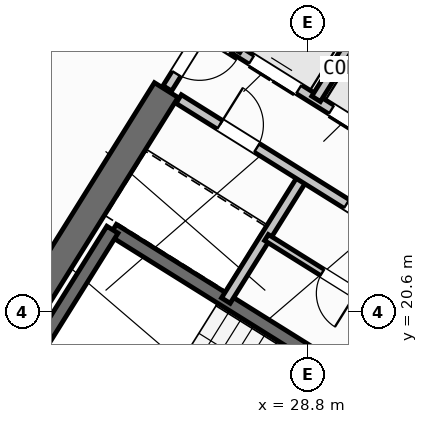
"""IFC4 building model, lengths in metres.
Left out: names, types, materials, properties, quantities, classifications, styles, units other than length and angle.
Written with IfcOpenShell. Run it as: python <this file> out.ifc"""

import sys

from ifc_helpers import new_model, si_unit, direction, frame, frame_2d, origin, place, context, subcontext, project, spatial, rectangle, extrude, source, transform, mapped, element, fill, save


model = new_model("IFC4")
c1 = context("Model", 3, precision=1e-05, world=origin(), true_north=direction((0.0, 1.0)))
c2 = subcontext(c1, "Body", "Model", "MODEL_VIEW")
j1 = project(units=[si_unit("LENGTHUNIT", "METRE"), si_unit("PLANEANGLEUNIT", "RADIAN")], contexts=[c1])
p1 = place(None, origin())
s1 = spatial("IfcSite", under=j1, at=p1, CompositionType="ELEMENT")
p2 = place(p1, origin())
s2 = spatial("IfcBuilding", under=s1, at=p2, CompositionType="ELEMENT")
p3 = place(p2, frame((0.0, 0.0, 174.9)))
s3 = spatial("IfcBuildingStorey", under=s2, at=p3, CompositionType="ELEMENT", Elevation=174.9)
p4 = place(p3, frame((40.573, 24.01, 0.0), z_axis=(0.0, 0.0, 1.0), x_axis=(-0.848047359947, 0.529920442413, 0.0)))
e1 = element("IfcWall", 1, at=p4, inside=s3, PredefinedType="SHEAR", context=c2, shape_type="SweptSolid", body=[
    extrude(rectangle(XDim=13.14, YDim=0.55, at=frame_2d((6.57, 0.0))), origin(), (0.0, 0.0, 1.0), 4.22),
])
p5 = place(p3, frame((26.007, 24.976, 0.0), z_axis=(0.0, 0.0, 1.0), x_axis=(-0.529923795287, -0.848045264823, 0.0)))
e2 = element("IfcWall", 2, at=p5, inside=s3, PredefinedType="SHEAR", context=c2, shape_type="SweptSolid", body=[
    extrude(rectangle(XDim=6.425, YDim=0.55, at=frame_2d((3.212, 0.0))), origin(), (0.0, 0.0, 1.0), 4.22),
])
p6 = place(p3, frame((29.268, 6.429, 0.0), z_axis=(0.0, 0.0, 1.0), x_axis=(-0.848049971435, 0.529916263149, 0.0)))
e3 = element("IfcWall", 3, at=p6, inside=s3, PredefinedType="STANDARD", context=c2, shape_type="SweptSolid", body=[
    extrude(rectangle(XDim=31.588, YDim=0.32, at=frame_2d((15.794, 0.0))), origin(), (0.0, 0.0, 1.0), 4.22),
])
p7 = place(p6, frame((27.641, 0.0, 0.0)))
e4 = element("IfcOpeningElement", 4, at=p7, cuts=e3, PredefinedType="OPENING", context=c2, shape_type="SweptSolid", body=[
    extrude(rectangle(XDim=1.2, YDim=2.15, at=frame_2d((0.6, 1.075))), frame((0.0, 0.17, 0.0), z_axis=(0.0, -1.0, 0.0), x_axis=(1.0, 0.0, 0.0)), (0.0, 0.0, 1.0), 0.34),
])
p8 = place(p6, frame((2.954, 0.0, 0.8)))
e5 = element("IfcOpeningElement", 5, at=p8, cuts=e3, PredefinedType="OPENING", context=c2, shape_type="SweptSolid", body=[
    extrude(rectangle(XDim=2.1, YDim=1.55, at=frame_2d((1.05, 0.775))), frame((0.0, 0.17, 0.0), z_axis=(0.0, -1.0, 0.0), x_axis=(1.0, 0.0, 0.0)), (0.0, 0.0, 1.0), 0.34),
])
p9 = place(p6, frame((8.253, 0.0, 0.8)))
e6 = element("IfcOpeningElement", 6, at=p9, cuts=e3, PredefinedType="OPENING", context=c2, shape_type="SweptSolid", body=[
    extrude(rectangle(XDim=2.1, YDim=1.55, at=frame_2d((1.05, 0.775))), frame((0.0, 0.17, 0.0), z_axis=(0.0, -1.0, 0.0), x_axis=(1.0, 0.0, 0.0)), (0.0, 0.0, 1.0), 0.34),
])
p10 = place(p6, frame((20.2, 0.0, 1.0)))
e7 = element("IfcOpeningElement", 7, at=p10, cuts=e3, PredefinedType="OPENING", context=c2, shape_type="SweptSolid", body=[
    extrude(rectangle(XDim=0.9, YDim=1.25, at=frame_2d((0.45, 0.625))), frame((0.0, 0.17, 0.0), z_axis=(0.0, -1.0, 0.0), x_axis=(1.0, 0.0, 0.0)), (0.0, 0.0, 1.0), 0.34),
])
p11 = place(p3, frame((14.138, 41.825, 0.0), z_axis=(0.0, 0.0, 1.0), x_axis=(0.848046498049, -0.529921821731, 0.0)))
e8 = element("IfcWall", 8, at=p11, inside=s3, PredefinedType="STANDARD", context=c2, shape_type="SweptSolid", body=[
    extrude(rectangle(XDim=31.588, YDim=0.32, at=frame_2d((15.794, 0.0))), origin(), (0.0, 0.0, 1.0), 4.22),
])
p12 = place(p11, frame((3.339, 0.0, 0.0)))
e9 = element("IfcOpeningElement", 9, at=p12, cuts=e8, PredefinedType="OPENING", context=c2, shape_type="SweptSolid", body=[
    extrude(rectangle(XDim=1.05, YDim=2.15, at=frame_2d((0.525, 1.075))), frame((0.0, 0.17, 0.0), z_axis=(0.0, -1.0, 0.0), x_axis=(1.0, 0.0, 0.0)), (0.0, 0.0, 1.0), 0.34),
])
p13 = place(p11, frame((1.819, 0.0, 1.0)))
e10 = element("IfcOpeningElement", 10, at=p13, cuts=e8, PredefinedType="OPENING", context=c2, shape_type="SweptSolid", body=[
    extrude(rectangle(XDim=0.9, YDim=1.25, at=frame_2d((0.45, 0.625))), frame((0.0, 0.17, 0.0), z_axis=(0.0, -1.0, 0.0), x_axis=(1.0, 0.0, 0.0)), (0.0, 0.0, 1.0), 0.34),
])
p14 = place(p11, frame((8.494, 0.0, 0.85)))
e11 = element("IfcOpeningElement", 11, at=p14, cuts=e8, PredefinedType="OPENING", context=c2, shape_type="SweptSolid", body=[
    extrude(rectangle(XDim=1.8, YDim=1.5, at=frame_2d((0.9, 0.75))), frame((0.0, 0.17, 0.0), z_axis=(0.0, -1.0, 0.0), x_axis=(1.0, 0.0, 0.0)), (0.0, 0.0, 1.0), 0.34),
])
p15 = place(p11, frame((14.636, 0.0, 1.0)))
e12 = element("IfcOpeningElement", 12, at=p15, cuts=e8, PredefinedType="OPENING", context=c2, shape_type="SweptSolid", body=[
    extrude(rectangle(XDim=0.9, YDim=1.25, at=frame_2d((0.45, 0.625))), frame((0.0, 0.17, 0.0), z_axis=(0.0, -1.0, 0.0), x_axis=(1.0, 0.0, 0.0)), (0.0, 0.0, 1.0), 0.34),
])
p16 = place(p11, frame((22.456, 0.0, 0.95)))
e13 = element("IfcOpeningElement", 13, at=p16, cuts=e8, PredefinedType="OPENING", context=c2, shape_type="SweptSolid", body=[
    extrude(rectangle(XDim=1.2, YDim=1.4, at=frame_2d((0.6, 0.7))), frame((0.0, 0.17, 0.0), z_axis=(0.0, -1.0, 0.0), x_axis=(1.0, 0.0, 0.0)), (0.0, 0.0, 1.0), 0.34),
])
p17 = place(p11, frame((27.131, 0.0, 0.95)))
e14 = element("IfcOpeningElement", 14, at=p17, cuts=e8, PredefinedType="OPENING", context=c2, shape_type="SweptSolid", body=[
    extrude(rectangle(XDim=1.2, YDim=1.4, at=frame_2d((0.6, 0.7))), frame((0.0, 0.17, 0.0), z_axis=(0.0, -1.0, 0.0), x_axis=(1.0, 0.0, 0.0)), (0.0, 0.0, 1.0), 0.34),
])
p18 = place(p3, frame((31.28, 18.261, 0.0), z_axis=(0.0, 0.0, 1.0), x_axis=(-0.848051618787, 0.529913626805, 0.0)))
e15 = element("IfcWall", 15, at=p18, inside=s3, PredefinedType="SHEAR", context=c2, shape_type="SweptSolid", body=[
    extrude(rectangle(XDim=7.46, YDim=0.26, at=frame_2d((3.73, 0.0))), origin(), (0.0, 0.0, 1.0), 4.22),
])
p19 = place(p18, frame((0.36, 0.0, 0.0)))
e16 = element("IfcOpeningElement", 16, at=p19, cuts=e15, PredefinedType="OPENING", context=c2, shape_type="SweptSolid", body=[
    extrude(rectangle(XDim=0.86, YDim=2.05, at=frame_2d((0.43, 1.025))), frame((0.0, 0.14, 0.0), z_axis=(0.0, -1.0, 0.0), x_axis=(1.0, 0.0, 0.0)), (0.0, 0.0, 1.0), 0.28),
])
p20 = place(p3, frame((24.945, 22.22, 0.0), z_axis=(0.0, 0.0, 1.0), x_axis=(-0.529908658664, -0.84805472316, 0.0)))
e17 = element("IfcWall", 17, at=p20, inside=s3, PredefinedType="SHEAR", context=c2, shape_type="SweptSolid", body=[
    extrude(rectangle(XDim=3.16, YDim=0.26, at=frame_2d((1.58, 0.0))), origin(), (0.0, 0.0, 1.0), 4.22),
])
p21 = place(p3, frame((31.822, 24.998, 0.0), z_axis=(0.0, 0.0, 1.0), x_axis=(-0.848036912365, 0.52993716162, 0.0)))
e18 = element("IfcWall", 18, at=p21, inside=s3, PredefinedType="STANDARD", context=c2, shape_type="SweptSolid", body=[
    extrude(rectangle(XDim=4.618, YDim=0.2, at=frame_2d((2.309, 0.0))), origin(), (0.0, 0.0, 1.0), 4.21),
])
p22 = place(p3, frame((32.108, 22.814, 0.0), z_axis=(0.0, 0.0, 1.0), x_axis=(-0.848042229521, 0.529928652696, 0.0)))
e19 = element("IfcWall", 19, at=p22, inside=s3, PredefinedType="STANDARD", context=c2, shape_type="SweptSolid", body=[
    extrude(rectangle(XDim=5.62, YDim=0.2, at=frame_2d((2.81, 0.0))), origin(), (0.0, 0.0, 1.0), 4.21),
])
p23 = place(p22, frame((0.39, 0.0, 0.0)))
e20 = element("IfcOpeningElement", 20, at=p23, cuts=e19, PredefinedType="OPENING", context=c2, shape_type="SweptSolid", body=[
    extrude(rectangle(XDim=1.1, YDim=2.15, at=frame_2d((0.55, 1.075))), frame((0.0, 0.11, 0.0), z_axis=(0.0, -1.0, 0.0), x_axis=(1.0, 0.0, 0.0)), (0.0, 0.0, 1.0), 0.22),
])
p24 = place(p22, frame((2.25, 0.0, 0.0)))
e21 = element("IfcOpeningElement", 21, at=p24, cuts=e19, PredefinedType="OPENING", context=c2, shape_type="SweptSolid", body=[
    extrude(rectangle(XDim=1.1, YDim=2.15, at=frame_2d((0.55, 1.075))), frame((0.0, 0.11, 0.0), z_axis=(0.0, -1.0, 0.0), x_axis=(1.0, 0.0, 0.0)), (0.0, 0.0, 1.0), 0.22),
])
p25 = place(p22, frame((4.11, 0.0, 0.0)))
e22 = element("IfcOpeningElement", 22, at=p25, cuts=e19, PredefinedType="OPENING", context=c2, shape_type="SweptSolid", body=[
    extrude(rectangle(XDim=1.1, YDim=2.15, at=frame_2d((0.55, 1.075))), frame((0.0, 0.11, 0.0), z_axis=(0.0, -1.0, 0.0), x_axis=(1.0, 0.0, 0.0)), (0.0, 0.0, 1.0), 0.22),
])
p26 = place(p3, frame((28.25, 27.17, 0.0), z_axis=(0.0, 0.0, 1.0), x_axis=(-0.529905827651, -0.848056492117, 0.0)))
e23 = element("IfcWall", 23, at=p26, inside=s3, PredefinedType="STANDARD", context=c2, shape_type="SweptSolid", body=[
    extrude(rectangle(XDim=1.65, YDim=0.2, at=frame_2d((0.825, 0.0))), origin(), (0.0, 0.0, 1.0), 4.21),
])
p27 = place(p3, frame((29.801, 26.142, 0.0), z_axis=(0.0, 0.0, 1.0), x_axis=(-0.529998940003, -0.847998304005, 0.0)))
e24 = element("IfcWall", 24, at=p27, inside=s3, PredefinedType="STANDARD", context=c2, shape_type="SweptSolid", body=[
    extrude(rectangle(XDim=1.58, YDim=0.2, at=frame_2d((0.79, 0.0))), origin(), (0.0, 0.0, 1.0), 4.21),
])
p28 = place(p3, frame((28.71, 23.263, 0.0), z_axis=(0.0, 0.0, 1.0), x_axis=(-0.529907497854, -0.848055448493, 0.0)))
e25 = element("IfcWall", 25, at=p28, inside=s3, PredefinedType="STANDARD", context=c2, shape_type="SweptSolid", body=[
    extrude(rectangle(XDim=2.88, YDim=0.2, at=frame_2d((1.44, 0.0))), origin(), (0.0, 0.0, 1.0), 4.21),
])
p29 = place(p3, frame((31.525, 21.504, 0.0), z_axis=(0.0, 0.0, 1.0), x_axis=(-0.848040211232, 0.529931882541, 0.0)))
e26 = element("IfcWall", 26, at=p29, inside=s3, PredefinedType="STANDARD", context=c2, shape_type="SweptSolid", body=[
    extrude(rectangle(XDim=6.218, YDim=0.2, at=frame_2d((3.109, 0.0))), origin(), (0.0, 0.0, 1.0), 4.21),
])
p30 = place(p29, frame((4.4, 0.0, 0.0)))
e27 = element("IfcOpeningElement", 27, at=p30, cuts=e26, PredefinedType="OPENING", context=c2, shape_type="SweptSolid", body=[
    extrude(rectangle(XDim=0.86, YDim=2.05, at=frame_2d((0.43, 1.025))), frame((0.0, 0.11, 0.0), z_axis=(0.0, -1.0, 0.0), x_axis=(1.0, 0.0, 0.0)), (0.0, 0.0, 1.0), 0.22),
])
p31 = place(p29, frame((1.45, 0.0, 0.0)))
e28 = element("IfcOpeningElement", 28, at=p31, cuts=e26, PredefinedType="OPENING", context=c2, shape_type="SweptSolid", body=[
    extrude(rectangle(XDim=0.86, YDim=2.05, at=frame_2d((0.43, 1.025))), frame((0.0, 0.11, 0.0), z_axis=(0.0, -1.0, 0.0), x_axis=(1.0, 0.0, 0.0)), (0.0, 0.0, 1.0), 0.22),
])
p32 = place(p3, frame((30.766, 20.327, 0.0), z_axis=(0.0, 0.0, 1.0), x_axis=(-0.848052663127, 0.529911955482, 0.0)))
e29 = element("IfcWall", 29, at=p32, inside=s3, PredefinedType="PLUMBINGWALL", context=c2, shape_type="SweptSolid", body=[
    extrude(rectangle(XDim=3.28, YDim=0.14, at=frame_2d((1.64, 0.0))), origin(), (0.0, 0.0, 1.0), 4.21),
])
p33 = place(p32, frame((1.2, 0.0, 0.0)))
e30 = element("IfcOpeningElement", 30, at=p33, cuts=e29, PredefinedType="OPENING", context=c2, shape_type="SweptSolid", body=[
    extrude(rectangle(XDim=0.78, YDim=2.05, at=frame_2d((0.39, 1.025))), frame((0.0, 0.08, 0.0), z_axis=(0.0, -1.0, 0.0), x_axis=(1.0, 0.0, 0.0)), (0.0, 0.0, 1.0), 0.16),
])
p34 = place(p3, frame((27.596, 27.52, 0.0), z_axis=(0.0, 0.0, 1.0), x_axis=(-0.529865479138, -0.848081702443, 0.0)))
e31 = element("IfcWall", 31, at=p34, inside=s3, PredefinedType="STANDARD", context=c2, shape_type="SweptSolid", body=[
    extrude(rectangle(XDim=2.96, YDim=0.2, at=frame_2d((1.48, 0.0))), origin(), (0.0, 0.0, 1.0), 2.395),
])
p35 = place(p34, frame((1.76, 0.0, 0.0)))
e32 = element("IfcOpeningElement", 32, at=p35, cuts=e31, PredefinedType="OPENING", context=c2, shape_type="SweptSolid", body=[
    extrude(rectangle(XDim=0.86, YDim=2.05, at=frame_2d((0.43, 1.025))), frame((0.0, 0.11, 0.0), z_axis=(0.0, -1.0, 0.0), x_axis=(1.0, 0.0, 0.0)), (0.0, 0.0, 1.0), 0.22),
])
p36 = place(p3, frame((25.198, 28.606, 0.0), z_axis=(0.0, 0.0, 1.0), x_axis=(-0.529921796515, -0.848046513806, 0.0)))
e33 = element("IfcWall", 33, at=p36, inside=s3, PredefinedType="PARTITIONING", context=c2, shape_type="SweptSolid", body=[
    extrude(rectangle(XDim=16.5, YDim=0.16, at=frame_2d((8.25, 0.0))), origin(), (0.0, 0.0, 1.0), 4.21),
])
m1 = source(origin(), c2, "Body", "SweptSolid", [
    extrude(rectangle(XDim=1.1, YDim=2.15, at=frame_2d((0.55, 1.075))), frame((0.0, 0.025, 0.0), z_axis=(0.0, -1.0, 0.0), x_axis=(1.0, 0.0, 0.0)), (0.0, 0.0, 1.0), 0.05),
])
p37 = place(p24, origin())
e34 = element("IfcDoor", 34, at=p37, inside=s3, OperationType="DOUBLE_DOOR_SLIDING", PredefinedType="DOOR", context=c2, shape_type="MappedRepresentation", body=[
    mapped(m1, transform((0.0, 0.0, 0.0), scale=1.0)),
])
fill(e21, e34)
p38 = place(p25, origin())
e35 = element("IfcDoor", 35, at=p38, inside=s3, OperationType="DOUBLE_DOOR_SLIDING", PredefinedType="DOOR", context=c2, shape_type="MappedRepresentation", body=[
    mapped(m1, transform((0.0, 0.0, 0.0), scale=1.0)),
])
fill(e22, e35)
m2 = source(origin(), c2, "Body", "SweptSolid", [
    extrude(rectangle(XDim=0.86, YDim=2.05, at=frame_2d((0.43, 1.025))), frame((0.0, 0.025, 0.0), z_axis=(0.0, -1.0, 0.0), x_axis=(1.0, 0.0, 0.0)), (0.0, 0.0, 1.0), 0.05),
])
p39 = place(p30, frame((0.86, 0.0, 0.0), z_axis=(0.0, 0.0, 1.0), x_axis=(-1.0, 0.0, 0.0)))
e36 = element("IfcDoor", 36, at=p39, inside=s3, OperationType="SINGLE_SWING_LEFT", PredefinedType="DOOR", context=c2, shape_type="MappedRepresentation", body=[
    mapped(m2, transform((0.0, 0.0, 0.0), scale=1.0)),
])
fill(e27, e36)
p40 = place(p31, frame((0.86, 0.0, 0.0), z_axis=(0.0, 0.0, 1.0), x_axis=(-1.0, 0.0, 0.0)))
e37 = element("IfcDoor", 37, at=p40, inside=s3, OperationType="SINGLE_SWING_RIGHT", PredefinedType="DOOR", context=c2, shape_type="MappedRepresentation", body=[
    mapped(m2, transform((0.0, 0.0, 0.0), scale=1.0)),
])
fill(e28, e37)
m3 = source(origin(), c2, "Body", "SweptSolid", [
    extrude(rectangle(XDim=0.78, YDim=2.05, at=frame_2d((0.39, 1.025))), frame((0.0, 0.025, 0.0), z_axis=(0.0, -1.0, 0.0), x_axis=(1.0, 0.0, 0.0)), (0.0, 0.0, 1.0), 0.05),
])
p41 = place(p33, origin())
e38 = element("IfcDoor", 38, at=p41, inside=s3, OperationType="SINGLE_SWING_LEFT", PredefinedType="DOOR", context=c2, shape_type="MappedRepresentation", body=[
    mapped(m3, transform((0.0, 0.0, 0.0), scale=1.0)),
])
fill(e30, e38)
p42 = place(p35, origin())
e39 = element("IfcDoor", 39, at=p42, inside=s3, OperationType="SINGLE_SWING_LEFT", PredefinedType="DOOR", context=c2, shape_type="MappedRepresentation", body=[
    mapped(m2, transform((0.0, 0.0, 0.0), scale=1.0)),
])
fill(e32, e39)
save(model, sys.argv[1])
